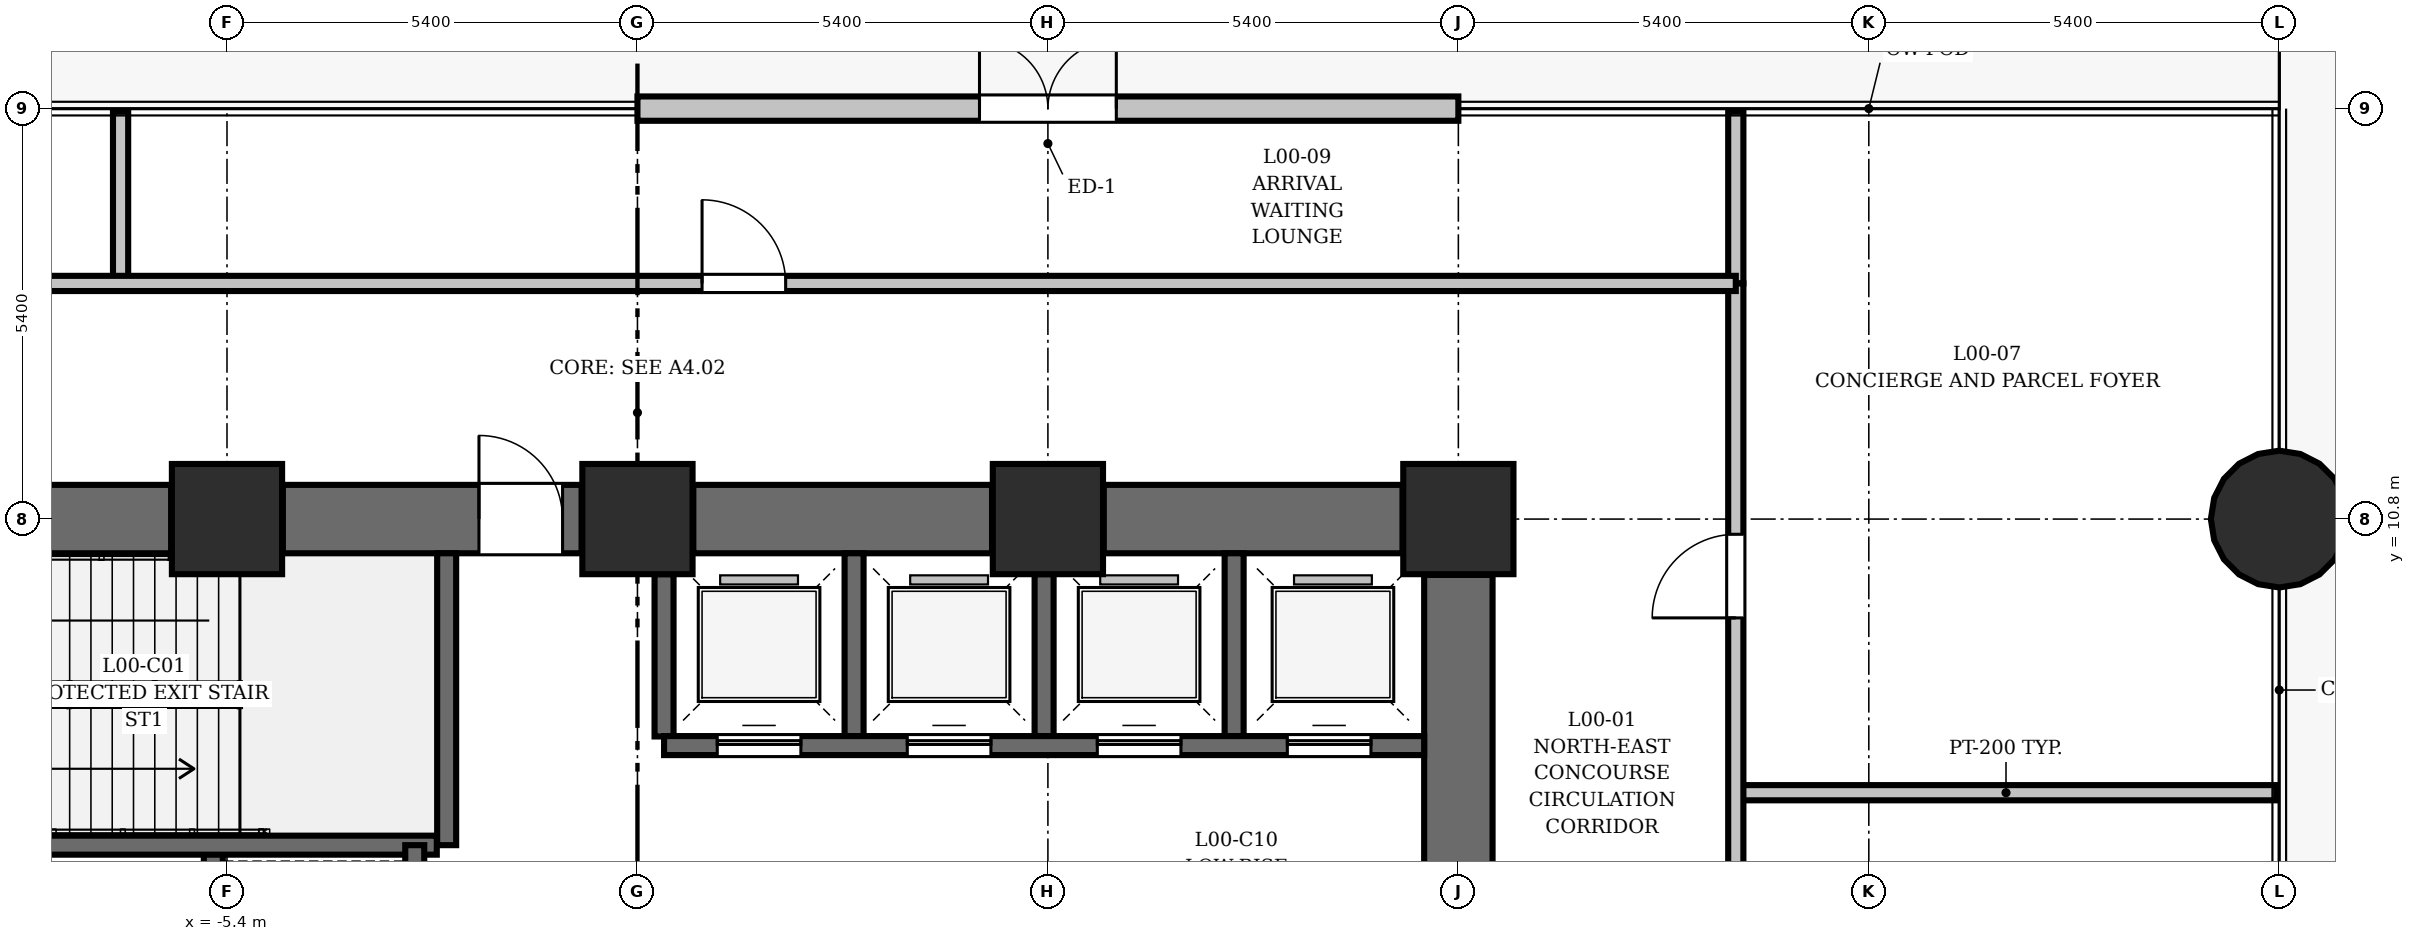
"""IFC4 building model, lengths in metres.
Left out: names, types, materials, properties, quantities, classifications, styles, units other than length and angle.
Written with IfcOpenShell. Run it as: python <this file> out.ifc"""

import sys

from ifc_helpers import new_model, si_unit, direction, frame, frame_2d, origin, origin_2d, place, context, subcontext, project, spatial, rectangle, circle, extrude, element, fill, save


model = new_model("IFC4")
c1 = context("Model", 3, precision=1e-05, world=origin(), true_north=direction((0.0, 1.0)))
c2 = subcontext(c1, "Body", "Model", "MODEL_VIEW")
j1 = project(units=[si_unit("LENGTHUNIT", "METRE"), si_unit("PLANEANGLEUNIT", "RADIAN")], contexts=[c1])
p1 = place(None, origin())
s1 = spatial("IfcSite", under=j1, at=p1, CompositionType="ELEMENT")
p2 = place(p1, origin())
s2 = spatial("IfcBuilding", under=s1, at=p2, CompositionType="ELEMENT")
p3 = place(p2, origin())
s3 = spatial("IfcBuildingStorey", under=s2, at=p3, CompositionType="ELEMENT", Elevation=0.0)
for number, where, z_axis, x_axis in (
    (1, (-5.4, 10.8, 0.0), (0.0, 0.0, 1.0), (1.0, 0.0, 0.0)),
    (2, (0.0, 10.8, 0.0), (0.0, 0.0, 1.0), (1.0, 0.0, 0.0)),
    (3, (5.4, 10.8, 0.0), (0.0, 0.0, 1.0), (1.0, 0.0, 0.0)),
    (4, (10.8, 10.8, 0.0), (0.0, 0.0, 1.0), (1.0, 0.0, 0.0)),
):
    element("IfcColumn", number, at=place(p3, frame(where, z_axis=z_axis, x_axis=x_axis)), inside=s3, PredefinedType="COLUMN", context=c2, shape_type="SweptSolid", body=[
        extrude(rectangle(XDim=1.45, YDim=1.45, at=origin_2d()), origin(), (0.0, 0.0, 1.0), 4.5),
    ])
p4 = place(p3, frame((21.6, 10.8, 0.0), z_axis=(0.0, 0.0, 1.0), x_axis=(1.0, 0.0, 0.0)))
e5 = element("IfcColumn", 5, at=p4, inside=s3, PredefinedType="COLUMN", context=c2, shape_type="SweptSolid", body=[
    extrude(circle(Radius=0.9, at=origin_2d()), origin(), (0.0, 0.0, 1.0), 4.5),
])
p5 = place(p3, frame((-10.065, 10.8, 0.0), z_axis=(0.0, 0.0, 1.0), x_axis=(1.0, 0.0, 0.0)))
e6 = element("IfcWall", 6, at=p5, inside=s3, PredefinedType="SHEAR", context=c2, shape_type="SweptSolid", body=[
    extrude(rectangle(XDim=3.93, YDim=0.9, at=frame_2d((1.965, 0.0))), origin(), (0.0, 0.0, 1.0), 4.5),
])
p6 = place(p3, frame((-4.665, 10.8, 0.0), z_axis=(0.0, 0.0, 1.0), x_axis=(1.0, 0.0, 0.0)))
e7 = element("IfcWall", 7, at=p6, inside=s3, PredefinedType="SHEAR", context=c2, shape_type="SweptSolid", body=[
    extrude(rectangle(XDim=3.93, YDim=0.9, at=frame_2d((1.965, 0.0))), origin(), (0.0, 0.0, 1.0), 4.5),
])
p7 = place(p6, frame((2.58, 0.0, 0.0)))
e8 = element("IfcOpeningElement", 8, at=p7, cuts=e7, PredefinedType="OPENING", context=c2, shape_type="SweptSolid", body=[
    extrude(rectangle(XDim=1.1, YDim=2.1, at=frame_2d((0.55, 1.05))), frame((0.0, 0.46, 0.0), z_axis=(0.0, -1.0, 0.0), x_axis=(1.0, 0.0, 0.0)), (0.0, 0.0, 1.0), 0.92),
])
for number, where, z_axis, x_axis in (
    (9, (0.735, 10.8, 0.0), (0.0, 0.0, 1.0), (1.0, 0.0, 0.0)),
    (10, (6.135, 10.8, 0.0), (0.0, 0.0, 1.0), (1.0, 0.0, 0.0)),
    (11, (10.8, 6.135, 0.0), (0.0, 0.0, 1.0), (0.0, 1.0, 0.0)),
):
    element("IfcWall", number, at=place(p3, frame(where, z_axis=z_axis, x_axis=x_axis)), inside=s3, PredefinedType="SHEAR", context=c2, shape_type="SweptSolid", body=[
        extrude(rectangle(XDim=3.93, YDim=0.9, at=frame_2d((1.965, 0.0))), origin(), (0.0, 0.0, 1.0), 4.5),
    ])
p8 = place(p3, frame((0.0, 16.2, 0.0), z_axis=(0.0, 0.0, 1.0), x_axis=(1.0, 0.0, 0.0)))
e12 = element("IfcWall", 12, at=p8, inside=s3, PredefinedType="STANDARD", context=c2, shape_type="SweptSolid", body=[
    extrude(rectangle(XDim=10.8, YDim=0.32, at=frame_2d((5.4, 0.0))), origin(), (0.0, 0.0, 1.0), 3.329),
])
p9 = place(p8, frame((4.5, 0.0, 0.0)))
e13 = element("IfcOpeningElement", 13, at=p9, cuts=e12, PredefinedType="OPENING", context=c2, shape_type="SweptSolid", body=[
    extrude(rectangle(XDim=1.8, YDim=2.35, at=frame_2d((0.9, 1.175))), frame((0.0, 0.17, 0.0), z_axis=(0.0, -1.0, 0.0), x_axis=(1.0, 0.0, 0.0)), (0.0, 0.0, 1.0), 0.34),
])
p10 = place(p3, frame((-5.58, 0.72, 0.0), z_axis=(0.0, 0.0, 1.0), x_axis=(0.0, 1.0, 0.0)))
e14 = element("IfcWall", 14, at=p10, inside=s3, PredefinedType="SHEAR", context=c2, shape_type="SweptSolid", body=[
    extrude(rectangle(XDim=5.79, YDim=0.25, at=frame_2d((2.895, 0.0))), origin(), (0.0, 0.0, 1.0), 4.5),
])
p11 = place(p10, frame((3.35, 0.0, 0.0)))
e15 = element("IfcOpeningElement", 15, at=p11, cuts=e14, PredefinedType="OPENING", context=c2, shape_type="SweptSolid", body=[
    extrude(rectangle(XDim=1.1, YDim=2.1, at=frame_2d((0.55, 1.05))), frame((0.0, 0.135, 0.0), z_axis=(0.0, -1.0, 0.0), x_axis=(1.0, 0.0, 0.0)), (0.0, 0.0, 1.0), 0.27),
])
p12 = place(p3, frame((2.85, 7.94, 0.0), z_axis=(0.0, 0.0, 1.0), x_axis=(0.0, 1.0, 0.0)))
e16 = element("IfcWall", 16, at=p12, inside=s3, PredefinedType="SHEAR", context=c2, shape_type="SweptSolid", body=[
    extrude(rectangle(XDim=2.41, YDim=0.25, at=frame_2d((1.205, 0.0))), origin(), (0.0, 0.0, 1.0), 4.5),
])
for number, where, z_axis, x_axis in (
    (17, (0.35, 7.94, 0.0), (0.0, 0.0, 1.0), (0.0, 1.0, 0.0)),
    (18, (5.35, 7.94, 0.0), (0.0, 0.0, 1.0), (0.0, 1.0, 0.0)),
):
    element("IfcWall", number, at=place(p3, frame(where, z_axis=z_axis, x_axis=x_axis)), inside=s3, PredefinedType="SHEAR", context=c2, shape_type="SweptSolid", body=[
        extrude(rectangle(XDim=2.135, YDim=0.25, at=frame_2d((1.067, 0.0))), origin(), (0.0, 0.0, 1.0), 4.5),
    ])
p13 = place(p3, frame((7.85, 7.94, 0.0), z_axis=(0.0, 0.0, 1.0), x_axis=(0.0, 1.0, 0.0)))
e19 = element("IfcWall", 19, at=p13, inside=s3, PredefinedType="SHEAR", context=c2, shape_type="SweptSolid", body=[
    extrude(rectangle(XDim=2.41, YDim=0.25, at=frame_2d((1.205, 0.0))), origin(), (0.0, 0.0, 1.0), 4.5),
])
p14 = place(p3, frame((0.35, 7.82, 0.0), z_axis=(0.0, 0.0, 1.0), x_axis=(1.0, 0.0, 0.0)))
e20 = element("IfcWall", 20, at=p14, inside=s3, PredefinedType="SHEAR", context=c2, shape_type="SweptSolid", body=[
    extrude(rectangle(XDim=10.0, YDim=0.25, at=frame_2d((5.0, 0.0))), origin(), (0.0, 0.0, 1.0), 4.5),
])
p15 = place(p14, frame((0.7, 0.0, 0.0)))
e21 = element("IfcOpeningElement", 21, at=p15, cuts=e20, PredefinedType="OPENING", context=c2, shape_type="SweptSolid", body=[
    extrude(rectangle(XDim=1.1, YDim=2.1, at=frame_2d((0.55, 1.05))), frame((0.0, 0.135, 0.0), z_axis=(0.0, -1.0, 0.0), x_axis=(1.0, 0.0, 0.0)), (0.0, 0.0, 1.0), 0.27),
])
p16 = place(p14, frame((3.2, 0.0, 0.0)))
e22 = element("IfcOpeningElement", 22, at=p16, cuts=e20, PredefinedType="OPENING", context=c2, shape_type="SweptSolid", body=[
    extrude(rectangle(XDim=1.1, YDim=2.1, at=frame_2d((0.55, 1.05))), frame((0.0, 0.135, 0.0), z_axis=(0.0, -1.0, 0.0), x_axis=(1.0, 0.0, 0.0)), (0.0, 0.0, 1.0), 0.27),
])
p17 = place(p14, frame((5.7, 0.0, 0.0)))
e23 = element("IfcOpeningElement", 23, at=p17, cuts=e20, PredefinedType="OPENING", context=c2, shape_type="SweptSolid", body=[
    extrude(rectangle(XDim=1.1, YDim=2.1, at=frame_2d((0.55, 1.05))), frame((0.0, 0.135, 0.0), z_axis=(0.0, -1.0, 0.0), x_axis=(1.0, 0.0, 0.0)), (0.0, 0.0, 1.0), 0.27),
])
p18 = place(p14, frame((8.2, 0.0, 0.0)))
e24 = element("IfcOpeningElement", 24, at=p18, cuts=e20, PredefinedType="OPENING", context=c2, shape_type="SweptSolid", body=[
    extrude(rectangle(XDim=1.1, YDim=2.1, at=frame_2d((0.55, 1.05))), frame((0.0, 0.135, 0.0), z_axis=(0.0, -1.0, 0.0), x_axis=(1.0, 0.0, 0.0)), (0.0, 0.0, 1.0), 0.27),
])
p19 = place(p3, frame((-2.51, 6.51, 0.0), z_axis=(0.0, 0.0, 1.0), x_axis=(0.0, 1.0, 0.0)))
e25 = element("IfcWall", 25, at=p19, inside=s3, PredefinedType="SHEAR", context=c2, shape_type="SweptSolid", body=[
    extrude(rectangle(XDim=3.84, YDim=0.25, at=frame_2d((1.92, 0.0))), origin(), (0.0, 0.0, 1.0), 4.5),
])
p20 = place(p3, frame((-10.34, 6.51, 0.0), z_axis=(0.0, 0.0, 1.0), x_axis=(1.0, 0.0, 0.0)))
e26 = element("IfcWall", 26, at=p20, inside=s3, PredefinedType="SHEAR", context=c2, shape_type="SweptSolid", body=[
    extrude(rectangle(XDim=7.7, YDim=0.25, at=frame_2d((3.85, 0.0))), origin(), (0.0, 0.0, 1.0), 4.5),
])
p21 = place(p20, frame((0.35, 0.0, 0.0)))
e27 = element("IfcOpeningElement", 27, at=p21, cuts=e26, PredefinedType="OPENING", context=c2, shape_type="SweptSolid", body=[
    extrude(rectangle(XDim=1.1, YDim=2.1, at=frame_2d((0.55, 1.05))), frame((0.0, 0.135, 0.0), z_axis=(0.0, -1.0, 0.0), x_axis=(1.0, 0.0, 0.0)), (0.0, 0.0, 1.0), 0.27),
])
p22 = place(p3, frame((-2.93, 0.68, 0.0), z_axis=(0.0, 0.0, 1.0), x_axis=(0.0, 1.0, 0.0)))
e28 = element("IfcWall", 28, at=p22, inside=s3, PredefinedType="SHEAR", context=c2, shape_type="SweptSolid", body=[
    extrude(rectangle(XDim=5.83, YDim=0.25, at=frame_2d((2.915, 0.0))), origin(), (0.0, 0.0, 1.0), 4.5),
])
p23 = place(p22, frame((0.75, 0.0, 0.0)))
e29 = element("IfcOpeningElement", 29, at=p23, cuts=e28, PredefinedType="OPENING", context=c2, shape_type="SweptSolid", body=[
    extrude(rectangle(XDim=1.2, YDim=2.1, at=frame_2d((0.6, 1.05))), frame((0.0, 0.135, 0.0), z_axis=(0.0, -1.0, 0.0), x_axis=(1.0, 0.0, 0.0)), (0.0, 0.0, 1.0), 0.27),
])
p24 = place(p3, frame((14.45, 7.2, 0.0), z_axis=(0.0, 0.0, 1.0), x_axis=(1.0, 0.0, 0.0)))
e30 = element("IfcWall", 30, at=p24, inside=s3, PredefinedType="PARTITIONING", context=c2, shape_type="SweptSolid", body=[
    extrude(rectangle(XDim=7.11, YDim=0.2, at=frame_2d((3.555, 0.0))), origin(), (0.0, 0.0, 1.0), 3.329),
])
for number, where, z_axis, x_axis in (
    (31, (-6.8, 13.9, 0.0), (0.0, 0.0, 1.0), (0.0, 1.0, 0.0)),
    (32, (14.45, 13.9, 0.0), (0.0, 0.0, 1.0), (0.0, 1.0, 0.0)),
):
    element("IfcWall", number, at=place(p3, frame(where, z_axis=z_axis, x_axis=x_axis)), inside=s3, PredefinedType="PARTITIONING", context=c2, shape_type="SweptSolid", body=[
        extrude(rectangle(XDim=2.26, YDim=0.2, at=frame_2d((1.13, 0.0))), origin(), (0.0, 0.0, 1.0), 4.2),
    ])
p25 = place(p3, frame((14.45, 0.0, 0.0), z_axis=(0.0, 0.0, 1.0), x_axis=(0.0, 1.0, 0.0)))
e33 = element("IfcWall", 33, at=p25, inside=s3, PredefinedType="PARTITIONING", context=c2, shape_type="SweptSolid", body=[
    extrude(rectangle(XDim=13.9, YDim=0.2, at=frame_2d((6.95, 0.0))), origin(), (0.0, 0.0, 1.0), 3.329),
])
p26 = place(p25, frame((2.5, 0.0, 0.0)))
e34 = element("IfcOpeningElement", 34, at=p26, cuts=e33, PredefinedType="OPENING", context=c2, shape_type="SweptSolid", body=[
    extrude(rectangle(XDim=1.1, YDim=2.1, at=frame_2d((0.55, 1.05))), frame((0.0, 0.11, 0.0), z_axis=(0.0, -1.0, 0.0), x_axis=(1.0, 0.0, 0.0)), (0.0, 0.0, 1.0), 0.22),
])
p27 = place(p25, frame((9.5, 0.0, 0.0)))
e35 = element("IfcOpeningElement", 35, at=p27, cuts=e33, PredefinedType="OPENING", context=c2, shape_type="SweptSolid", body=[
    extrude(rectangle(XDim=1.1, YDim=2.1, at=frame_2d((0.55, 1.05))), frame((0.0, 0.11, 0.0), z_axis=(0.0, -1.0, 0.0), x_axis=(1.0, 0.0, 0.0)), (0.0, 0.0, 1.0), 0.22),
])
p28 = place(p3, frame((-13.15, 13.9, 0.0), z_axis=(0.0, 0.0, 1.0), x_axis=(1.0, 0.0, 0.0)))
e36 = element("IfcWall", 36, at=p28, inside=s3, PredefinedType="PARTITIONING", context=c2, shape_type="SweptSolid", body=[
    extrude(rectangle(XDim=27.6, YDim=0.2, at=frame_2d((13.8, 0.0))), origin(), (0.0, 0.0, 1.0), 3.329),
])
p29 = place(p28, frame((3.2, 0.0, 0.0)))
e37 = element("IfcOpeningElement", 37, at=p29, cuts=e36, PredefinedType="OPENING", context=c2, shape_type="SweptSolid", body=[
    extrude(rectangle(XDim=0.85, YDim=2.1, at=frame_2d((0.425, 1.05))), frame((0.0, 0.11, 0.0), z_axis=(0.0, -1.0, 0.0), x_axis=(1.0, 0.0, 0.0)), (0.0, 0.0, 1.0), 0.22),
])
p30 = place(p28, frame((14.0, 0.0, 0.0)))
e38 = element("IfcOpeningElement", 38, at=p30, cuts=e36, PredefinedType="OPENING", context=c2, shape_type="SweptSolid", body=[
    extrude(rectangle(XDim=1.1, YDim=2.1, at=frame_2d((0.55, 1.05))), frame((0.0, 0.11, 0.0), z_axis=(0.0, -1.0, 0.0), x_axis=(1.0, 0.0, 0.0)), (0.0, 0.0, 1.0), 0.22),
])
p31 = place(p9, origin())
e39 = element("IfcDoor", 39, at=p31, inside=s3, OperationType="DOUBLE_DOOR_SINGLE_SWING", PredefinedType="DOOR", context=c2, shape_type="SweptSolid", body=[
    extrude(rectangle(XDim=1.8, YDim=2.35, at=frame_2d((0.9, 1.175))), frame((0.0, 0.025, 0.0), z_axis=(0.0, -1.0, 0.0), x_axis=(1.0, 0.0, 0.0)), (0.0, 0.0, 1.0), 0.05),
])
fill(e13, e39)
p32 = place(p7, origin())
e40 = element("IfcDoor", 40, at=p32, inside=s3, OperationType="SINGLE_SWING_LEFT", PredefinedType="DOOR", context=c2, shape_type="SweptSolid", body=[
    extrude(rectangle(XDim=1.1, YDim=2.1, at=frame_2d((0.55, 1.05))), frame((0.0, 0.025, 0.0), z_axis=(0.0, -1.0, 0.0), x_axis=(1.0, 0.0, 0.0)), (0.0, 0.0, 1.0), 0.05),
])
fill(e8, e40)
p33 = place(p15, origin())
e41 = element("IfcDoor", 41, at=p33, inside=s3, OperationType="SLIDING_TO_LEFT", PredefinedType="DOOR", context=c2, shape_type="SweptSolid", body=[
    extrude(rectangle(XDim=1.1, YDim=2.1, at=frame_2d((0.55, 1.05))), frame((0.0, 0.025, 0.0), z_axis=(0.0, -1.0, 0.0), x_axis=(1.0, 0.0, 0.0)), (0.0, 0.0, 1.0), 0.05),
])
fill(e21, e41)
p34 = place(p16, origin())
e42 = element("IfcDoor", 42, at=p34, inside=s3, OperationType="SLIDING_TO_LEFT", PredefinedType="DOOR", context=c2, shape_type="SweptSolid", body=[
    extrude(rectangle(XDim=1.1, YDim=2.1, at=frame_2d((0.55, 1.05))), frame((0.0, 0.025, 0.0), z_axis=(0.0, -1.0, 0.0), x_axis=(1.0, 0.0, 0.0)), (0.0, 0.0, 1.0), 0.05),
])
fill(e22, e42)
p35 = place(p17, origin())
e43 = element("IfcDoor", 43, at=p35, inside=s3, OperationType="SLIDING_TO_LEFT", PredefinedType="DOOR", context=c2, shape_type="SweptSolid", body=[
    extrude(rectangle(XDim=1.1, YDim=2.1, at=frame_2d((0.55, 1.05))), frame((0.0, 0.025, 0.0), z_axis=(0.0, -1.0, 0.0), x_axis=(1.0, 0.0, 0.0)), (0.0, 0.0, 1.0), 0.05),
])
fill(e23, e43)
p36 = place(p18, origin())
e44 = element("IfcDoor", 44, at=p36, inside=s3, OperationType="SLIDING_TO_LEFT", PredefinedType="DOOR", context=c2, shape_type="SweptSolid", body=[
    extrude(rectangle(XDim=1.1, YDim=2.1, at=frame_2d((0.55, 1.05))), frame((0.0, 0.025, 0.0), z_axis=(0.0, -1.0, 0.0), x_axis=(1.0, 0.0, 0.0)), (0.0, 0.0, 1.0), 0.05),
])
fill(e24, e44)
p37 = place(p27, origin())
e45 = element("IfcDoor", 45, at=p37, inside=s3, OperationType="SINGLE_SWING_LEFT", PredefinedType="DOOR", context=c2, shape_type="SweptSolid", body=[
    extrude(rectangle(XDim=1.1, YDim=2.1, at=frame_2d((0.55, 1.05))), frame((0.0, 0.025, 0.0), z_axis=(0.0, -1.0, 0.0), x_axis=(1.0, 0.0, 0.0)), (0.0, 0.0, 1.0), 0.05),
])
fill(e35, e45)
p38 = place(p30, origin())
e46 = element("IfcDoor", 46, at=p38, inside=s3, OperationType="SINGLE_SWING_LEFT", PredefinedType="DOOR", context=c2, shape_type="SweptSolid", body=[
    extrude(rectangle(XDim=1.1, YDim=2.1, at=frame_2d((0.55, 1.05))), frame((0.0, 0.025, 0.0), z_axis=(0.0, -1.0, 0.0), x_axis=(1.0, 0.0, 0.0)), (0.0, 0.0, 1.0), 0.05),
])
fill(e38, e46)
save(model, sys.argv[1])
